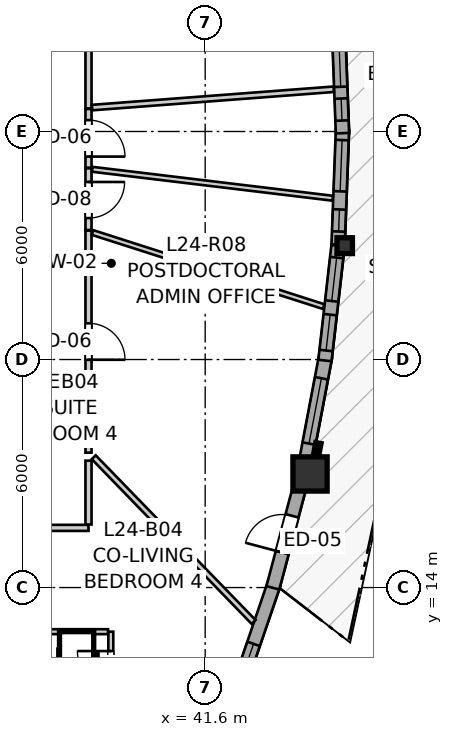
"""IFC4 building model, lengths in metres.
Left out: names, types, materials, properties, quantities, classifications, styles, units other than length and angle.
Written with IfcOpenShell. Run it as: python <this file> out.ifc"""

import sys

from ifc_helpers import new_model, si_unit, direction, frame, frame_2d, origin, origin_2d, place, context, subcontext, project, spatial, rectangle, i_section, extrude, source, transform, mapped, element, fill, save


model = new_model("IFC4")
c1 = context("Model", 3, precision=1e-05, world=origin(), true_north=direction((0.0, 1.0)))
c2 = subcontext(c1, "Body", "Model", "MODEL_VIEW")
j1 = project(units=[si_unit("LENGTHUNIT", "METRE"), si_unit("PLANEANGLEUNIT", "RADIAN")], contexts=[c1])
p1 = place(None, origin())
s1 = spatial("IfcSite", under=j1, at=p1, CompositionType="ELEMENT")
p2 = place(p1, origin())
s2 = spatial("IfcBuilding", under=s1, at=p2, CompositionType="ELEMENT")
p3 = place(p2, frame((0.0, 0.0, 83.2)))
s3 = spatial("IfcBuildingStorey", under=s2, at=p3, CompositionType="ELEMENT", Elevation=83.2)
m1 = source(origin(), c2, "Body", "SweptSolid", [
    extrude(rectangle(XDim=0.9, YDim=0.9, at=origin_2d()), origin(), (0.0, 0.0, 1.0), 2.935),
])
p4 = place(p3, frame((44.359, 16.989, 0.0), z_axis=(0.0, 0.0, 1.0), x_axis=(1.0, 0.0, 0.0)))
e1 = element("IfcColumn", 1, at=p4, inside=s3, PredefinedType="COLUMN", context=c2, shape_type="MappedRepresentation", body=[
    mapped(m1, transform((0.0, 0.0, 0.0), x_axis=(1.0, 0.0, 0.0), y_axis=(0.0, 1.0, 0.0), z_axis=(0.0, 0.0, 1.0), scale=1.0)),
])
m2 = source(origin(), c2, "Body", "SweptSolid", [
    extrude(i_section(OverallWidth=0.406, OverallDepth=0.416, WebThickness=0.027, FlangeThickness=0.044, FilletRadius=0.015, at=origin_2d()), origin(), (0.0, 0.0, 1.0), 2.935),
])
p5 = place(p3, frame((45.272, 22.996, 0.0), z_axis=(0.0, 0.0, 1.0), x_axis=(1.0, 0.0, 0.0)))
e2 = element("IfcColumn", 2, at=p5, inside=s3, PredefinedType="PILASTER", context=c2, shape_type="MappedRepresentation", body=[
    mapped(m2, transform((0.0, 0.0, 0.0), x_axis=(1.0, 0.0, 0.0), y_axis=(0.0, 1.0, 0.0), z_axis=(0.0, 0.0, 1.0), scale=1.0)),
])
p6 = place(p3, frame((42.373, 11.057, 0.0), z_axis=(0.0, 0.0, 1.0), x_axis=(0.323628226775, 0.946184321808, 0.0)))
e3 = element("IfcWall", 3, at=p6, inside=s3, PredefinedType="SOLIDWALL", context=c2, shape_type="SweptSolid", body=[
    extrude(rectangle(XDim=3.193, YDim=0.35, at=frame_2d((1.596, 0.0))), origin(), (0.0, 0.0, 1.0), 2.465),
])
p7 = place(p6, frame((0.595, 0.0, 0.82)))
e4 = element("IfcOpeningElement", 4, at=p7, cuts=e3, PredefinedType="OPENING", context=c2, shape_type="SweptSolid", body=[
    extrude(rectangle(XDim=0.95, YDim=1.35, at=frame_2d((0.475, 0.675))), frame((0.0, 0.185, 0.0), z_axis=(0.0, -1.0, 0.0), x_axis=(1.0, 0.0, 0.0)), (0.0, 0.0, 1.0), 0.37),
])
p8 = place(p3, frame((43.381, 13.993, 0.0), z_axis=(0.0, 0.0, 1.0), x_axis=(0.257079998736, 0.966390125286, 0.0)))
e5 = element("IfcWall", 5, at=p8, inside=s3, PredefinedType="SOLIDWALL", context=c2, shape_type="SweptSolid", body=[
    extrude(rectangle(XDim=2.921, YDim=0.35, at=frame_2d((1.46, 0.0))), origin(), (0.0, 0.0, 1.0), 2.465),
])
p9 = place(p8, frame((0.961, 0.0, 0.0)))
e6 = element("IfcOpeningElement", 6, at=p9, cuts=e5, PredefinedType="OPENING", context=c2, shape_type="SweptSolid", body=[
    extrude(rectangle(XDim=1.0, YDim=2.1, at=frame_2d((0.5, 1.05))), frame((0.0, 0.185, 0.0), z_axis=(0.0, -1.0, 0.0), x_axis=(1.0, 0.0, 0.0)), (0.0, 0.0, 1.0), 0.37),
])
p10 = place(p3, frame((44.229, 17.242, 0.0), z_axis=(0.0, 0.0, 1.0), x_axis=(0.186588413417, 0.982438173107, 0.0)))
e7 = element("IfcWall", 7, at=p10, inside=s3, PredefinedType="SOLIDWALL", context=c2, shape_type="SweptSolid", body=[
    extrude(rectangle(XDim=2.871, YDim=0.35, at=frame_2d((1.436, 0.0))), origin(), (0.0, 0.0, 1.0), 2.465),
])
p11 = place(p10, frame((0.555, 0.0, 0.82)))
e8 = element("IfcOpeningElement", 8, at=p11, cuts=e7, PredefinedType="OPENING", context=c2, shape_type="SweptSolid", body=[
    extrude(rectangle(XDim=1.75, YDim=1.3, at=frame_2d((0.875, 0.65))), frame((0.0, 0.185, 0.0), z_axis=(0.0, -1.0, 0.0), x_axis=(1.0, 0.0, 0.0)), (0.0, 0.0, 1.0), 0.37),
])
p12 = place(p3, frame((44.751, 19.975, 0.0), z_axis=(0.0, 0.0, 1.0), x_axis=(0.113356399423, 0.993554390413, 0.0)))
e9 = element("IfcWall", 9, at=p12, inside=s3, PredefinedType="SOLIDWALL", context=c2, shape_type="SweptSolid", body=[
    extrude(rectangle(XDim=3.041, YDim=0.35, at=frame_2d((1.521, 0.0))), origin(), (0.0, 0.0, 1.0), 2.465),
])
p13 = place(p12, frame((0.264, 0.0, 0.82)))
e10 = element("IfcOpeningElement", 10, at=p13, cuts=e9, PredefinedType="OPENING", context=c2, shape_type="SweptSolid", body=[
    extrude(rectangle(XDim=0.95, YDim=1.35, at=frame_2d((0.475, 0.675))), frame((0.0, 0.185, 0.0), z_axis=(0.0, -1.0, 0.0), x_axis=(1.0, 0.0, 0.0)), (0.0, 0.0, 1.0), 0.37),
])
p14 = place(p12, frame((1.575, 0.0, 0.82)))
e11 = element("IfcOpeningElement", 11, at=p14, cuts=e9, PredefinedType="OPENING", context=c2, shape_type="SweptSolid", body=[
    extrude(rectangle(XDim=1.15, YDim=1.2, at=frame_2d((0.575, 0.6))), frame((0.0, 0.185, 0.0), z_axis=(0.0, -1.0, 0.0), x_axis=(1.0, 0.0, 0.0)), (0.0, 0.0, 1.0), 0.37),
])
p15 = place(p3, frame((45.098, 23.023, 0.0), z_axis=(0.0, 0.0, 1.0), x_axis=(0.037943250197, 0.999279895607, 0.0)))
e12 = element("IfcWall", 12, at=p15, inside=s3, PredefinedType="SOLIDWALL", context=c2, shape_type="SweptSolid", body=[
    extrude(rectangle(XDim=3.024, YDim=0.35, at=frame_2d((1.512, 0.0))), origin(), (0.0, 0.0, 1.0), 2.465),
])
p16 = place(p15, frame((0.346, 0.0, 0.82)))
e13 = element("IfcOpeningElement", 13, at=p16, cuts=e12, PredefinedType="OPENING", context=c2, shape_type="SweptSolid", body=[
    extrude(rectangle(XDim=0.58, YDim=1.35, at=frame_2d((0.29, 0.675))), frame((0.0, 0.185, 0.0), z_axis=(0.0, -1.0, 0.0), x_axis=(1.0, 0.0, 0.0)), (0.0, 0.0, 1.0), 0.37),
])
p17 = place(p15, frame((1.404, 0.0, 0.82)))
e14 = element("IfcOpeningElement", 14, at=p17, cuts=e12, PredefinedType="OPENING", context=c2, shape_type="SweptSolid", body=[
    extrude(rectangle(XDim=1.35, YDim=1.45, at=frame_2d((0.675, 0.725))), frame((0.0, 0.185, 0.0), z_axis=(0.0, -1.0, 0.0), x_axis=(1.0, 0.0, 0.0)), (0.0, 0.0, 1.0), 0.37),
])
p18 = place(p3, frame((45.213, 25.955, 0.0), z_axis=(0.0, 0.0, 1.0), x_axis=(-0.037934195255, 0.999280239388, 0.0)))
e15 = element("IfcWall", 15, at=p18, inside=s3, PredefinedType="SOLIDWALL", context=c2, shape_type="SweptSolid", body=[
    extrude(rectangle(XDim=2.819, YDim=0.35, at=frame_2d((1.409, 0.0))), origin(), (0.0, 0.0, 1.0), 2.465),
])
p19 = place(p18, frame((0.332, 0.0, 0.82)))
e16 = element("IfcOpeningElement", 16, at=p19, cuts=e15, PredefinedType="OPENING", context=c2, shape_type="SweptSolid", body=[
    extrude(rectangle(XDim=0.58, YDim=1.35, at=frame_2d((0.29, 0.675))), frame((0.0, 0.185, 0.0), z_axis=(0.0, -1.0, 0.0), x_axis=(1.0, 0.0, 0.0)), (0.0, 0.0, 1.0), 0.37),
])
p20 = place(p18, frame((1.222, 0.0, 0.82)))
e17 = element("IfcOpeningElement", 17, at=p20, cuts=e15, PredefinedType="OPENING", context=c2, shape_type="SweptSolid", body=[
    extrude(rectangle(XDim=1.15, YDim=1.2, at=frame_2d((0.575, 0.6))), frame((0.0, 0.185, 0.0), z_axis=(0.0, -1.0, 0.0), x_axis=(1.0, 0.0, 0.0)), (0.0, 0.0, 1.0), 0.37),
])
p21 = place(p3, frame((38.53, 23.392, 0.0), z_axis=(0.0, 0.0, 1.0), x_axis=(0.0, -1.0, 0.0)))
e18 = element("IfcWall", 18, at=p21, inside=s3, PredefinedType="PARTITIONING", context=c2, shape_type="SweptSolid", body=[
    extrude(rectangle(XDim=5.843, YDim=0.16, at=frame_2d((2.921, 0.0))), origin(), (0.0, 0.0, 1.0), 2.935),
])
p22 = place(p21, frame((2.438, 0.0, 0.0)))
e19 = element("IfcOpeningElement", 19, at=p22, cuts=e18, PredefinedType="OPENING", context=c2, shape_type="SweptSolid", body=[
    extrude(rectangle(XDim=0.96, YDim=2.1, at=frame_2d((0.48, 1.05))), frame((0.0, 0.09, 0.0), z_axis=(0.0, -1.0, 0.0), x_axis=(1.0, 0.0, 0.0)), (0.0, 0.0, 1.0), 0.18),
])
p23 = place(p3, frame((38.53, 31.856, 0.0), z_axis=(0.0, 0.0, 1.0), x_axis=(0.0, -1.0, 0.0)))
e20 = element("IfcWall", 20, at=p23, inside=s3, PredefinedType="PARTITIONING", context=c2, shape_type="SweptSolid", body=[
    extrude(rectangle(XDim=5.249, YDim=0.16, at=frame_2d((2.625, 0.0))), origin(), (0.0, 0.0, 1.0), 2.935),
])
p24 = place(p23, frame((2.146, 0.0, 0.0)))
e21 = element("IfcOpeningElement", 21, at=p24, cuts=e20, PredefinedType="OPENING", context=c2, shape_type="SweptSolid", body=[
    extrude(rectangle(XDim=0.96, YDim=2.1, at=frame_2d((0.48, 1.05))), frame((0.0, 0.09, 0.0), z_axis=(0.0, -1.0, 0.0), x_axis=(1.0, 0.0, 0.0)), (0.0, 0.0, 1.0), 0.18),
])
p25 = place(p3, frame((38.53, 15.57, 0.0), z_axis=(0.0, 0.0, 1.0), x_axis=(-1.0, 0.0, 0.0)))
e22 = element("IfcWall", 22, at=p25, inside=s3, PredefinedType="PARTITIONING", context=c2, shape_type="SweptSolid", body=[
    extrude(rectangle(XDim=3.257, YDim=0.16, at=frame_2d((1.628, 0.0))), origin(), (0.0, 0.0, 1.0), 2.935),
])
p26 = place(p25, frame((1.16, 0.0, 0.0)))
e23 = element("IfcOpeningElement", 23, at=p26, cuts=e22, PredefinedType="OPENING", context=c2, shape_type="SweptSolid", body=[
    extrude(rectangle(XDim=0.92, YDim=2.1, at=frame_2d((0.46, 1.05))), frame((0.0, 0.09, 0.0), z_axis=(0.0, -1.0, 0.0), x_axis=(1.0, 0.0, 0.0)), (0.0, 0.0, 1.0), 0.18),
])
p27 = place(p3, frame((39.117, 10.939, 0.0), z_axis=(0.0, 0.0, 1.0), x_axis=(0.0, 1.0, 0.0)))
e24 = element("IfcWall", 24, at=p27, inside=s3, PredefinedType="PARTITIONING", context=c2, shape_type="SweptSolid", body=[
    extrude(rectangle(XDim=1.9, YDim=0.13, at=frame_2d((0.95, 0.0))), origin(), (0.0, 0.0, 1.0), 2.935),
])
p28 = place(p27, frame((0.51, 0.0, 0.0)))
e25 = element("IfcOpeningElement", 25, at=p28, cuts=e24, PredefinedType="OPENING", context=c2, shape_type="SweptSolid", body=[
    extrude(rectangle(XDim=0.88, YDim=2.05, at=frame_2d((0.44, 1.025))), frame((0.0, 0.075, 0.0), z_axis=(0.0, -1.0, 0.0), x_axis=(1.0, 0.0, 0.0)), (0.0, 0.0, 1.0), 0.15),
])
p29 = place(p3, frame((38.53, 25.032, 0.0), z_axis=(0.0, 0.0, 1.0), x_axis=(0.0, -1.0, 0.0)))
e26 = element("IfcWall", 26, at=p29, inside=s3, PredefinedType="PARTITIONING", context=c2, shape_type="SweptSolid", body=[
    extrude(rectangle(XDim=1.625, YDim=0.16, at=frame_2d((0.812, 0.0))), origin(), (0.0, 0.0, 1.0), 2.935),
])
p30 = place(p29, frame((0.361, 0.0, 0.0)))
e27 = element("IfcOpeningElement", 27, at=p30, cuts=e26, PredefinedType="OPENING", context=c2, shape_type="SweptSolid", body=[
    extrude(rectangle(XDim=0.95, YDim=2.1, at=frame_2d((0.475, 1.05))), frame((0.0, 0.09, 0.0), z_axis=(0.0, -1.0, 0.0), x_axis=(1.0, 0.0, 0.0)), (0.0, 0.0, 1.0), 0.18),
])
p31 = place(p3, frame((38.53, 26.592, 0.0), z_axis=(0.0, 0.0, 1.0), x_axis=(0.0, -1.0, 0.0)))
e28 = element("IfcWall", 28, at=p31, inside=s3, PredefinedType="PARTITIONING", context=c2, shape_type="SweptSolid", body=[
    extrude(rectangle(XDim=1.545, YDim=0.16, at=frame_2d((0.772, 0.0))), origin(), (0.0, 0.0, 1.0), 2.935),
])
p32 = place(p31, frame((0.292, 0.0, 0.0)))
e29 = element("IfcOpeningElement", 29, at=p32, cuts=e28, PredefinedType="OPENING", context=c2, shape_type="SweptSolid", body=[
    extrude(rectangle(XDim=0.96, YDim=2.1, at=frame_2d((0.48, 1.05))), frame((0.0, 0.09, 0.0), z_axis=(0.0, -1.0, 0.0), x_axis=(1.0, 0.0, 0.0)), (0.0, 0.0, 1.0), 0.18),
])
p33 = place(p3, frame((38.637, 23.342, 0.0), z_axis=(0.0, 0.0, 1.0), x_axis=(0.952253923936, -0.305307163933, 0.0)))
e30 = element("IfcWall", 30, at=p33, inside=s3, PredefinedType="PARTITIONING", context=c2, shape_type="SweptSolid", body=[
    extrude(rectangle(XDim=6.384, YDim=0.13, at=frame_2d((3.192, 0.0))), origin(), (0.0, 0.0, 1.0), 2.935),
])
p34 = place(p3, frame((38.626, 25.006, 0.0), z_axis=(0.0, 0.0, 1.0), x_axis=(0.992837647249, -0.11947136144, 0.0)))
e31 = element("IfcWall", 31, at=p34, inside=s3, PredefinedType="PARTITIONING", context=c2, shape_type="SweptSolid", body=[
    extrude(rectangle(XDim=6.376, YDim=0.13, at=frame_2d((3.188, 0.0))), origin(), (0.0, 0.0, 1.0), 2.935),
])
p35 = place(p3, frame((38.624, 26.629, 0.0), z_axis=(0.0, 0.0, 1.0), x_axis=(0.997137880159, 0.075604549805, 0.0)))
e32 = element("IfcWall", 32, at=p35, inside=s3, PredefinedType="PARTITIONING", context=c2, shape_type="SweptSolid", body=[
    extrude(rectangle(XDim=6.378, YDim=0.145, at=frame_2d((3.189, 0.0))), origin(), (0.0, 0.0, 1.0), 2.935),
])
p36 = place(p3, frame((38.667, 17.429, 0.0), z_axis=(0.0, 0.0, 1.0), x_axis=(0.696417222112, -0.717637131666, 0.0)))
e33 = element("IfcWall", 33, at=p36, inside=s3, PredefinedType="PARTITIONING", context=c2, shape_type="SweptSolid", body=[
    extrude(rectangle(XDim=6.04, YDim=0.145, at=frame_2d((3.02, 0.0))), origin(), (0.0, 0.0, 1.0), 2.935),
])
p37 = place(p3, frame((38.53, 15.658, 0.0), z_axis=(0.0, 0.0, 1.0), x_axis=(0.0, 1.0, 0.0)))
e34 = element("IfcWall", 34, at=p37, inside=s3, PredefinedType="PARTITIONING", context=c2, shape_type="SweptSolid", body=[
    extrude(rectangle(XDim=1.682, YDim=0.16, at=frame_2d((0.841, 0.0))), origin(), (0.0, 0.0, 1.0), 2.935),
])
p38 = place(p3, frame((37.317, 12.839, 0.0), z_axis=(0.0, 0.0, 1.0), x_axis=(1.0, 0.0, 0.0)))
e35 = element("IfcWall", 35, at=p38, inside=s3, PredefinedType="PARTITIONING", context=c2, shape_type="SweptSolid", body=[
    extrude(rectangle(XDim=1.727, YDim=0.13, at=frame_2d((0.864, 0.0))), origin(), (0.0, 0.0, 1.0), 2.935),
])
m3 = source(origin(), c2, "Body", "SweptSolid", [
    extrude(rectangle(XDim=0.95, YDim=1.35, at=frame_2d((0.475, 0.675))), frame((0.0, 0.03, 0.0), z_axis=(0.0, -1.0, 0.0), x_axis=(1.0, 0.0, 0.0)), (0.0, 0.0, 1.0), 0.06),
])
p39 = place(p7, origin())
e36 = element("IfcWindow", 36, at=p39, inside=s3, PartitioningType="SINGLE_PANEL", PredefinedType="WINDOW", context=c2, shape_type="MappedRepresentation", body=[
    mapped(m3, transform((0.0, 0.0, 0.0), x_axis=(1.0, 0.0, 0.0), y_axis=(0.0, 1.0, 0.0), z_axis=(0.0, 0.0, 1.0), scale=1.0)),
])
fill(e4, e36)
m4 = source(origin(), c2, "Body", "SweptSolid", [
    extrude(rectangle(XDim=1.75, YDim=1.3, at=frame_2d((0.875, 0.65))), frame((0.0, 0.03, 0.0), z_axis=(0.0, -1.0, 0.0), x_axis=(1.0, 0.0, 0.0)), (0.0, 0.0, 1.0), 0.06),
])
p40 = place(p11, origin())
e37 = element("IfcWindow", 37, at=p40, inside=s3, PartitioningType="SINGLE_PANEL", PredefinedType="WINDOW", context=c2, shape_type="MappedRepresentation", body=[
    mapped(m4, transform((0.0, 0.0, 0.0), x_axis=(1.0, 0.0, 0.0), y_axis=(0.0, 1.0, 0.0), z_axis=(0.0, 0.0, 1.0), scale=1.0)),
])
fill(e8, e37)
p41 = place(p13, origin())
e38 = element("IfcWindow", 38, at=p41, inside=s3, PartitioningType="SINGLE_PANEL", PredefinedType="WINDOW", context=c2, shape_type="MappedRepresentation", body=[
    mapped(m3, transform((0.0, 0.0, 0.0), x_axis=(1.0, 0.0, 0.0), y_axis=(0.0, 1.0, 0.0), z_axis=(0.0, 0.0, 1.0), scale=1.0)),
])
fill(e10, e38)
m5 = source(origin(), c2, "Body", "SweptSolid", [
    extrude(rectangle(XDim=1.15, YDim=1.2, at=frame_2d((0.575, 0.6))), frame((0.0, 0.03, 0.0), z_axis=(0.0, -1.0, 0.0), x_axis=(1.0, 0.0, 0.0)), (0.0, 0.0, 1.0), 0.06),
])
p42 = place(p14, origin())
e39 = element("IfcWindow", 39, at=p42, inside=s3, PartitioningType="SINGLE_PANEL", PredefinedType="WINDOW", context=c2, shape_type="MappedRepresentation", body=[
    mapped(m5, transform((0.0, 0.0, 0.0), x_axis=(1.0, 0.0, 0.0), y_axis=(0.0, 1.0, 0.0), z_axis=(0.0, 0.0, 1.0), scale=1.0)),
])
fill(e11, e39)
m6 = source(origin(), c2, "Body", "SweptSolid", [
    extrude(rectangle(XDim=0.58, YDim=1.35, at=frame_2d((0.29, 0.675))), frame((0.0, 0.03, 0.0), z_axis=(0.0, -1.0, 0.0), x_axis=(1.0, 0.0, 0.0)), (0.0, 0.0, 1.0), 0.06),
])
p43 = place(p16, origin())
e40 = element("IfcWindow", 40, at=p43, inside=s3, PartitioningType="SINGLE_PANEL", PredefinedType="WINDOW", context=c2, shape_type="MappedRepresentation", body=[
    mapped(m6, transform((0.0, 0.0, 0.0), x_axis=(1.0, 0.0, 0.0), y_axis=(0.0, 1.0, 0.0), z_axis=(0.0, 0.0, 1.0), scale=1.0)),
])
fill(e13, e40)
m7 = source(origin(), c2, "Body", "SweptSolid", [
    extrude(rectangle(XDim=1.35, YDim=1.45, at=frame_2d((0.675, 0.725))), frame((0.0, 0.03, 0.0), z_axis=(0.0, -1.0, 0.0), x_axis=(1.0, 0.0, 0.0)), (0.0, 0.0, 1.0), 0.06),
])
p44 = place(p17, origin())
e41 = element("IfcWindow", 41, at=p44, inside=s3, PartitioningType="SINGLE_PANEL", PredefinedType="WINDOW", context=c2, shape_type="MappedRepresentation", body=[
    mapped(m7, transform((0.0, 0.0, 0.0), x_axis=(1.0, 0.0, 0.0), y_axis=(0.0, 1.0, 0.0), z_axis=(0.0, 0.0, 1.0), scale=1.0)),
])
fill(e14, e41)
p45 = place(p19, origin())
e42 = element("IfcWindow", 42, at=p45, inside=s3, PartitioningType="SINGLE_PANEL", PredefinedType="WINDOW", context=c2, shape_type="MappedRepresentation", body=[
    mapped(m6, transform((0.0, 0.0, 0.0), x_axis=(1.0, 0.0, 0.0), y_axis=(0.0, 1.0, 0.0), z_axis=(0.0, 0.0, 1.0), scale=1.0)),
])
fill(e16, e42)
p46 = place(p20, origin())
e43 = element("IfcWindow", 43, at=p46, inside=s3, PartitioningType="SINGLE_PANEL", PredefinedType="WINDOW", context=c2, shape_type="MappedRepresentation", body=[
    mapped(m5, transform((0.0, 0.0, 0.0), x_axis=(1.0, 0.0, 0.0), y_axis=(0.0, 1.0, 0.0), z_axis=(0.0, 0.0, 1.0), scale=1.0)),
])
fill(e17, e43)
m8 = source(origin(), c2, "Body", "SweptSolid", [
    extrude(rectangle(XDim=1.0, YDim=2.1, at=frame_2d((0.5, 1.05))), frame((0.0, 0.025, 0.0), z_axis=(0.0, -1.0, 0.0), x_axis=(1.0, 0.0, 0.0)), (0.0, 0.0, 1.0), 0.05),
])
p47 = place(p9, origin())
e44 = element("IfcDoor", 44, at=p47, inside=s3, OperationType="SINGLE_SWING_LEFT", PredefinedType="DOOR", context=c2, shape_type="MappedRepresentation", body=[
    mapped(m8, transform((0.0, 0.0, 0.0), x_axis=(1.0, 0.0, 0.0), y_axis=(0.0, 1.0, 0.0), z_axis=(0.0, 0.0, 1.0), scale=1.0)),
])
fill(e6, e44)
m9 = source(origin(), c2, "Body", "SweptSolid", [
    extrude(rectangle(XDim=0.96, YDim=2.1, at=frame_2d((0.48, 1.05))), frame((0.0, 0.025, 0.0), z_axis=(0.0, -1.0, 0.0), x_axis=(1.0, 0.0, 0.0)), (0.0, 0.0, 1.0), 0.05),
])
p48 = place(p22, origin())
e45 = element("IfcDoor", 45, at=p48, inside=s3, OperationType="SINGLE_SWING_RIGHT", PredefinedType="DOOR", context=c2, shape_type="MappedRepresentation", body=[
    mapped(m9, transform((0.0, 0.0, 0.0), x_axis=(1.0, 0.0, 0.0), y_axis=(0.0, 1.0, 0.0), z_axis=(0.0, 0.0, 1.0), scale=1.0)),
])
fill(e19, e45)
m10 = source(origin(), c2, "Body", "SweptSolid", [
    extrude(rectangle(XDim=0.88, YDim=2.05, at=frame_2d((0.44, 1.025))), frame((0.0, 0.025, 0.0), z_axis=(0.0, -1.0, 0.0), x_axis=(1.0, 0.0, 0.0)), (0.0, 0.0, 1.0), 0.05),
])
p49 = place(p28, origin())
e46 = element("IfcDoor", 46, at=p49, inside=s3, OperationType="SINGLE_SWING_RIGHT", PredefinedType="DOOR", context=c2, shape_type="MappedRepresentation", body=[
    mapped(m10, transform((0.0, 0.0, 0.0), x_axis=(1.0, 0.0, 0.0), y_axis=(0.0, 1.0, 0.0), z_axis=(0.0, 0.0, 1.0), scale=1.0)),
])
fill(e25, e46)
m11 = source(origin(), c2, "Body", "SweptSolid", [
    extrude(rectangle(XDim=0.95, YDim=2.1, at=frame_2d((0.475, 1.05))), frame((0.0, 0.025, 0.0), z_axis=(0.0, -1.0, 0.0), x_axis=(1.0, 0.0, 0.0)), (0.0, 0.0, 1.0), 0.05),
])
p50 = place(p30, origin())
e47 = element("IfcDoor", 47, at=p50, inside=s3, OperationType="SINGLE_SWING_LEFT", PredefinedType="DOOR", context=c2, shape_type="MappedRepresentation", body=[
    mapped(m11, transform((0.0, 0.0, 0.0), x_axis=(1.0, 0.0, 0.0), y_axis=(0.0, 1.0, 0.0), z_axis=(0.0, 0.0, 1.0), scale=1.0)),
])
fill(e27, e47)
p51 = place(p32, origin())
e48 = element("IfcDoor", 48, at=p51, inside=s3, OperationType="SINGLE_SWING_RIGHT", PredefinedType="DOOR", context=c2, shape_type="MappedRepresentation", body=[
    mapped(m9, transform((0.0, 0.0, 0.0), x_axis=(1.0, 0.0, 0.0), y_axis=(0.0, 1.0, 0.0), z_axis=(0.0, 0.0, 1.0), scale=1.0)),
])
fill(e29, e48)
save(model, sys.argv[1])
